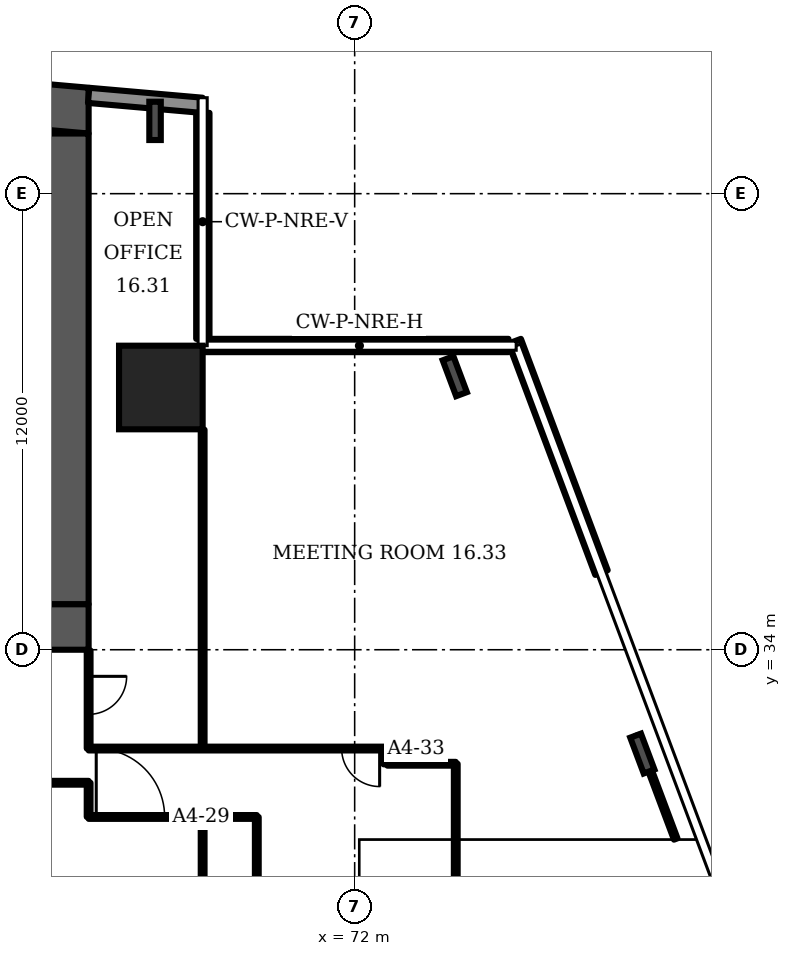
"""IFC4 building model, lengths in metres.
Left out: names, types, materials, properties, quantities, classifications, styles, units other than length and angle.
Written with IfcOpenShell. Run it as: python <this file> out.ifc"""

import sys

from ifc_helpers import new_model, si_unit, direction, frame, frame_2d, origin, origin_2d, place, context, subcontext, project, spatial, polyline, rectangle, i_section, outline, extrude, element, fill, save


model = new_model("IFC4")
c1 = context("Model", 3, precision=1e-05, world=origin(), true_north=direction((0.0, 1.0)))
c2 = subcontext(c1, "Body", "Model", "MODEL_VIEW")
j1 = project(units=[si_unit("LENGTHUNIT", "METRE"), si_unit("PLANEANGLEUNIT", "RADIAN")], contexts=[c1])
p1 = place(None, origin())
s1 = spatial("IfcSite", under=j1, at=p1, CompositionType="ELEMENT")
p2 = place(p1, origin())
s2 = spatial("IfcBuilding", under=s1, at=p2, CompositionType="ELEMENT")
p3 = place(p2, frame((0.0, 0.0, 77.5)))
s3 = spatial("IfcBuildingStorey", under=s2, at=p3, CompositionType="ELEMENT", Elevation=77.5)
p4 = place(p3, origin())
e1 = element("IfcWall", 1, at=p4, inside=s3, PredefinedType="SHEAR", context=c2, shape_type="SweptSolid", body=[
    extrude(outline(polyline([(9.0, 47.583), (37.0, 50.032), (65.0, 47.583), (65.0, 48.787), (37.0, 51.237), (9.0, 48.787), (9.0, 47.583)])), origin(), (0.0, 0.0, 1.0), 3.6),
])
p5 = place(p3, frame((9.0, 34.6, 0.0), z_axis=(0.0, 0.0, 1.0), x_axis=(1.0, 0.0, 0.0)))
e2 = element("IfcWall", 2, at=p5, inside=s3, PredefinedType="SHEAR", context=c2, shape_type="SweptSolid", body=[
    extrude(rectangle(XDim=56.0, YDim=1.2, at=frame_2d((28.0, 0.0))), origin(), (0.0, 0.0, 1.0), 3.6),
])
p6 = place(p5, frame((3.3, 0.0, 0.0)))
e3 = element("IfcOpeningElement", 3, at=p6, cuts=e2, PredefinedType="OPENING", context=c2, shape_type="SweptSolid", body=[
    extrude(rectangle(XDim=1.0, YDim=2.1, at=frame_2d((0.5, 1.05))), frame((0.0, 0.61, 0.0), z_axis=(0.0, -1.0, 0.0), x_axis=(1.0, 0.0, 0.0)), (0.0, 0.0, 1.0), 1.22),
])
p7 = place(p5, frame((7.867, 0.0, 0.0)))
e4 = element("IfcOpeningElement", 4, at=p7, cuts=e2, PredefinedType="OPENING", context=c2, shape_type="SweptSolid", body=[
    extrude(rectangle(XDim=1.1, YDim=2.1, at=frame_2d((0.55, 1.05))), frame((0.0, 0.61, 0.0), z_axis=(0.0, -1.0, 0.0), x_axis=(1.0, 0.0, 0.0)), (0.0, 0.0, 1.0), 1.22),
])
p8 = place(p5, frame((12.033, 0.0, 0.0)))
e5 = element("IfcOpeningElement", 5, at=p8, cuts=e2, PredefinedType="OPENING", context=c2, shape_type="SweptSolid", body=[
    extrude(rectangle(XDim=1.1, YDim=2.1, at=frame_2d((0.55, 1.05))), frame((0.0, 0.61, 0.0), z_axis=(0.0, -1.0, 0.0), x_axis=(1.0, 0.0, 0.0)), (0.0, 0.0, 1.0), 1.22),
])
p9 = place(p5, frame((9.8, 0.0, 0.0)))
e6 = element("IfcOpeningElement", 6, at=p9, cuts=e2, PredefinedType="OPENING", context=c2, shape_type="SweptSolid", body=[
    extrude(rectangle(XDim=1.4, YDim=2.1, at=frame_2d((0.7, 1.05))), frame((0.0, 0.61, 0.0), z_axis=(0.0, -1.0, 0.0), x_axis=(1.0, 0.0, 0.0)), (0.0, 0.0, 1.0), 1.22),
])
p10 = place(p5, frame((14.65, 0.0, 0.0)))
e7 = element("IfcOpeningElement", 7, at=p10, cuts=e2, PredefinedType="OPENING", context=c2, shape_type="SweptSolid", body=[
    extrude(rectangle(XDim=1.2, YDim=2.1, at=frame_2d((0.6, 1.05))), frame((0.0, 0.61, 0.0), z_axis=(0.0, -1.0, 0.0), x_axis=(1.0, 0.0, 0.0)), (0.0, 0.0, 1.0), 1.22),
])
p11 = place(p5, frame((21.867, 0.0, 0.0)))
e8 = element("IfcOpeningElement", 8, at=p11, cuts=e2, PredefinedType="OPENING", context=c2, shape_type="SweptSolid", body=[
    extrude(rectangle(XDim=1.1, YDim=2.1, at=frame_2d((0.55, 1.05))), frame((0.0, 0.61, 0.0), z_axis=(0.0, -1.0, 0.0), x_axis=(1.0, 0.0, 0.0)), (0.0, 0.0, 1.0), 1.22),
])
p12 = place(p5, frame((26.033, 0.0, 0.0)))
e9 = element("IfcOpeningElement", 9, at=p12, cuts=e2, PredefinedType="OPENING", context=c2, shape_type="SweptSolid", body=[
    extrude(rectangle(XDim=1.1, YDim=2.1, at=frame_2d((0.55, 1.05))), frame((0.0, 0.61, 0.0), z_axis=(0.0, -1.0, 0.0), x_axis=(1.0, 0.0, 0.0)), (0.0, 0.0, 1.0), 1.22),
])
p13 = place(p5, frame((23.8, 0.0, 0.0)))
e10 = element("IfcOpeningElement", 10, at=p13, cuts=e2, PredefinedType="OPENING", context=c2, shape_type="SweptSolid", body=[
    extrude(rectangle(XDim=1.4, YDim=2.1, at=frame_2d((0.7, 1.05))), frame((0.0, 0.61, 0.0), z_axis=(0.0, -1.0, 0.0), x_axis=(1.0, 0.0, 0.0)), (0.0, 0.0, 1.0), 1.22),
])
p14 = place(p5, frame((28.867, 0.0, 0.0)))
e11 = element("IfcOpeningElement", 11, at=p14, cuts=e2, PredefinedType="OPENING", context=c2, shape_type="SweptSolid", body=[
    extrude(rectangle(XDim=1.1, YDim=2.1, at=frame_2d((0.55, 1.05))), frame((0.0, 0.61, 0.0), z_axis=(0.0, -1.0, 0.0), x_axis=(1.0, 0.0, 0.0)), (0.0, 0.0, 1.0), 1.22),
])
p15 = place(p5, frame((33.033, 0.0, 0.0)))
e12 = element("IfcOpeningElement", 12, at=p15, cuts=e2, PredefinedType="OPENING", context=c2, shape_type="SweptSolid", body=[
    extrude(rectangle(XDim=1.1, YDim=2.1, at=frame_2d((0.55, 1.05))), frame((0.0, 0.61, 0.0), z_axis=(0.0, -1.0, 0.0), x_axis=(1.0, 0.0, 0.0)), (0.0, 0.0, 1.0), 1.22),
])
p16 = place(p5, frame((40.15, 0.0, 0.0)))
e13 = element("IfcOpeningElement", 13, at=p16, cuts=e2, PredefinedType="OPENING", context=c2, shape_type="SweptSolid", body=[
    extrude(rectangle(XDim=1.2, YDim=2.1, at=frame_2d((0.6, 1.05))), frame((0.0, 0.61, 0.0), z_axis=(0.0, -1.0, 0.0), x_axis=(1.0, 0.0, 0.0)), (0.0, 0.0, 1.0), 1.22),
])
p17 = place(p5, frame((44.8, 0.0, 0.0)))
e14 = element("IfcOpeningElement", 14, at=p17, cuts=e2, PredefinedType="OPENING", context=c2, shape_type="SweptSolid", body=[
    extrude(rectangle(XDim=1.4, YDim=2.1, at=frame_2d((0.7, 1.05))), frame((0.0, 0.61, 0.0), z_axis=(0.0, -1.0, 0.0), x_axis=(1.0, 0.0, 0.0)), (0.0, 0.0, 1.0), 1.22),
])
p18 = place(p5, frame((49.867, 0.0, 0.0)))
e15 = element("IfcOpeningElement", 15, at=p18, cuts=e2, PredefinedType="OPENING", context=c2, shape_type="SweptSolid", body=[
    extrude(rectangle(XDim=1.1, YDim=2.1, at=frame_2d((0.55, 1.05))), frame((0.0, 0.61, 0.0), z_axis=(0.0, -1.0, 0.0), x_axis=(1.0, 0.0, 0.0)), (0.0, 0.0, 1.0), 1.22),
])
p19 = place(p5, frame((53.5, 0.0, 0.0)))
e16 = element("IfcOpeningElement", 16, at=p19, cuts=e2, PredefinedType="OPENING", context=c2, shape_type="SweptSolid", body=[
    extrude(rectangle(XDim=1.1, YDim=2.1, at=frame_2d((0.55, 1.05))), frame((0.0, 0.61, 0.0), z_axis=(0.0, -1.0, 0.0), x_axis=(1.0, 0.0, 0.0)), (0.0, 0.0, 1.0), 1.22),
])
p20 = place(p5, frame((51.567, 0.0, 0.0)))
e17 = element("IfcOpeningElement", 17, at=p20, cuts=e2, PredefinedType="OPENING", context=c2, shape_type="SweptSolid", body=[
    extrude(rectangle(XDim=1.4, YDim=2.1, at=frame_2d((0.7, 1.05))), frame((0.0, 0.61, 0.0), z_axis=(0.0, -1.0, 0.0), x_axis=(1.0, 0.0, 0.0)), (0.0, 0.0, 1.0), 1.22),
])
p21 = place(p3, frame((64.4, 35.2, 0.0), z_axis=(0.0, 0.0, 1.0), x_axis=(0.0, 1.0, 0.0)))
e18 = element("IfcWall", 18, at=p21, inside=s3, PredefinedType="SHEAR", context=c2, shape_type="SweptSolid", body=[
    extrude(rectangle(XDim=12.383, YDim=1.2, at=frame_2d((6.191, 0.0))), origin(), (0.0, 0.0, 1.0), 3.6),
])
p22 = place(p3, frame((66.9, 40.9, 0.0), z_axis=(0.0, 0.0, 1.0), x_axis=(1.0, 0.0, 0.0)))
e19 = element("IfcColumn", 19, at=p22, inside=s3, PredefinedType="COLUMN", context=c2, shape_type="SweptSolid", body=[
    extrude(rectangle(XDim=2.2, YDim=2.2, at=origin_2d()), origin(), (0.0, 0.0, 1.0), 3.6),
])
for number, where, z_axis, x_axis in (
    (20, (79.57, 31.268, 0.0), (0.0, 0.0, 1.0), (0.936, 0.351, 0.0)),
    (21, (74.634, 41.196, 0.0), (0.0, 0.0, 1.0), (0.936, 0.351, 0.0)),
    (22, (66.748, 47.915, 0.0), (0.0, 0.0, 1.0), (1.0, 0.0, 0.0)),
):
    element("IfcColumn", number, at=place(p3, frame(where, z_axis=z_axis, x_axis=x_axis)), inside=s3, PredefinedType="COLUMN", context=c2, shape_type="SweptSolid", body=[
        extrude(i_section(OverallWidth=0.302, OverallDepth=1.008, WebThickness=0.021, FlangeThickness=0.04, FilletRadius=0.03, at=origin_2d()), origin(), (0.0, 0.0, 1.0), 3.6),
    ])
p23 = place(p3, frame((67.983, 48.326, 0.0), z_axis=(0.0, 0.0, 1.0), x_axis=(-0.996194, 0.087168, 0.0)))
e23 = element("IfcWall", 23, at=p23, inside=s3, PredefinedType="SOLIDWALL", context=c2, shape_type="SweptSolid", body=[
    extrude(rectangle(XDim=2.994, YDim=0.4, at=frame_2d((1.497, 0.0))), origin(), (0.0, 0.0, 1.0), 3.2),
])
p24 = place(p3, frame((78.494, 36.03, 0.0), z_axis=(0.0, 0.0, 1.0), x_axis=(-0.351108, 0.936338, 0.0)))
e24 = element("IfcWall", 24, at=p24, inside=s3, PredefinedType="SOLIDWALL", context=c2, shape_type="SweptSolid", body=[
    extrude(rectangle(XDim=6.503, YDim=0.35, at=frame_2d((3.251, 0.0))), origin(), (0.0, 0.0, 1.0), 1.0),
])
p25 = place(p3, frame((76.047, 42.005, 0.0), z_axis=(0.0, 0.0, 1.0), x_axis=(-1.0, 0.0, 0.0)))
e25 = element("IfcWall", 25, at=p25, inside=s3, PredefinedType="SOLIDWALL", context=c2, shape_type="SweptSolid", body=[
    extrude(rectangle(XDim=8.047, YDim=0.35, at=frame_2d((4.023, 0.0))), origin(), (0.0, 0.0, 1.0), 1.0),
])
p26 = place(p3, frame((68.005, 42.18, 0.0), z_axis=(0.0, 0.0, 1.0), x_axis=(0.0, 1.0, 0.0)))
e26 = element("IfcWall", 26, at=p26, inside=s3, PredefinedType="SOLIDWALL", context=c2, shape_type="SweptSolid", body=[
    extrude(rectangle(XDim=5.947, YDim=0.35, at=frame_2d((2.973, 0.0))), origin(), (0.0, 0.0, 1.0), 1.0),
])
p27 = place(p3, frame((45.3, 30.5, 0.0), z_axis=(0.0, 0.0, 1.0), x_axis=(1.0, 0.0, 0.0)))
e27 = element("IfcWall", 27, at=p27, inside=s3, PredefinedType="PARTITIONING", context=c2, shape_type="SweptSolid", body=[
    extrude(rectangle(XDim=19.7, YDim=0.1, at=frame_2d((9.85, 0.0))), origin(), (0.0, 0.0, 1.0), 3.2),
])
p28 = place(p3, frame((65.0, 29.6, 0.0), z_axis=(0.0, 0.0, 1.0), x_axis=(0.0, 1.0, 0.0)))
e28 = element("IfcWall", 28, at=p28, inside=s3, PredefinedType="PARTITIONING", context=c2, shape_type="SweptSolid", body=[
    extrude(rectangle(XDim=0.9, YDim=0.1, at=frame_2d((0.45, 0.0))), origin(), (0.0, 0.0, 1.0), 3.2),
])
p29 = place(p3, frame((65.0, 29.6, 0.0), z_axis=(0.0, 0.0, 1.0), x_axis=(1.0, 0.0, 0.0)))
e29 = element("IfcWall", 29, at=p29, inside=s3, PredefinedType="PARTITIONING", context=c2, shape_type="SweptSolid", body=[
    extrude(rectangle(XDim=4.425, YDim=0.1, at=frame_2d((2.212, 0.0))), origin(), (0.0, 0.0, 1.0), 3.2),
])
p30 = place(p29, frame((0.2, 0.0, 0.0)))
e30 = element("IfcOpeningElement", 30, at=p30, cuts=e29, PredefinedType="OPENING", context=c2, shape_type="SweptSolid", body=[
    extrude(rectangle(XDim=1.8, YDim=2.1, at=frame_2d((0.9, 1.05))), frame((0.0, 0.06, 0.0), z_axis=(0.0, -1.0, 0.0), x_axis=(1.0, 0.0, 0.0)), (0.0, 0.0, 1.0), 0.12),
])
p31 = place(p3, frame((65.0, 31.4, 0.0), z_axis=(0.0, 0.0, 1.0), x_axis=(0.0, 1.0, 0.0)))
e31 = element("IfcWall", 31, at=p31, inside=s3, PredefinedType="PARTITIONING", context=c2, shape_type="SweptSolid", body=[
    extrude(rectangle(XDim=2.58, YDim=0.1, at=frame_2d((1.29, 0.0))), origin(), (0.0, 0.0, 1.0), 3.2),
])
p32 = place(p31, frame((0.9, 0.0, 0.0)))
e32 = element("IfcOpeningElement", 32, at=p32, cuts=e31, PredefinedType="OPENING", context=c2, shape_type="SweptSolid", body=[
    extrude(rectangle(XDim=1.0, YDim=2.1, at=frame_2d((0.5, 1.05))), frame((0.0, 0.06, 0.0), z_axis=(0.0, -1.0, 0.0), x_axis=(1.0, 0.0, 0.0)), (0.0, 0.0, 1.0), 0.12),
])
p33 = place(p3, frame((65.0, 31.4, 0.0), z_axis=(0.0, 0.0, 1.0), x_axis=(1.0, 0.0, 0.0)))
e33 = element("IfcWall", 33, at=p33, inside=s3, PredefinedType="PARTITIONING", context=c2, shape_type="SweptSolid", body=[
    extrude(rectangle(XDim=7.81, YDim=0.1, at=frame_2d((3.905, 0.0))), origin(), (0.0, 0.0, 1.0), 3.2),
])
p34 = place(p33, frame((6.657, 0.0, 0.0)))
e34 = element("IfcOpeningElement", 34, at=p34, cuts=e33, PredefinedType="OPENING", context=c2, shape_type="SweptSolid", body=[
    extrude(rectangle(XDim=1.0, YDim=2.1, at=frame_2d((0.5, 1.05))), frame((0.0, 0.06, 0.0), z_axis=(0.0, -1.0, 0.0), x_axis=(1.0, 0.0, 0.0)), (0.0, 0.0, 1.0), 0.12),
])
p35 = place(p3, frame((68.0, 13.24, 0.0), z_axis=(0.0, 0.0, 1.0), x_axis=(0.0, 1.0, 0.0)))
e35 = element("IfcWall", 35, at=p35, inside=s3, PredefinedType="PARTITIONING", context=c2, shape_type="SweptSolid", body=[
    extrude(rectangle(XDim=16.36, YDim=0.1, at=frame_2d((8.18, 0.0))), origin(), (0.0, 0.0, 1.0), 3.2),
])
p36 = place(p3, frame((68.0, 31.4, 0.0), z_axis=(0.0, 0.0, 1.0), x_axis=(0.0, 1.0, 0.0)))
e36 = element("IfcWall", 36, at=p36, inside=s3, PredefinedType="PARTITIONING", context=c2, shape_type="SweptSolid", body=[
    extrude(rectangle(XDim=8.39, YDim=0.1, at=frame_2d((4.195, 0.0))), origin(), (0.0, 0.0, 1.0), 3.2),
])
p37 = place(p3, frame((69.425, 26.4, 0.0), z_axis=(0.0, 0.0, 1.0), x_axis=(0.0, 1.0, 0.0)))
e37 = element("IfcWall", 37, at=p37, inside=s3, PredefinedType="PARTITIONING", context=c2, shape_type="SweptSolid", body=[
    extrude(rectangle(XDim=3.2, YDim=0.1, at=frame_2d((1.6, 0.0))), origin(), (0.0, 0.0, 1.0), 3.2),
])
p38 = place(p3, frame((72.81, 30.985, 0.0), z_axis=(0.0, 0.0, 1.0), x_axis=(0.0, 1.0, 0.0)))
e38 = element("IfcWall", 38, at=p38, inside=s3, PredefinedType="PARTITIONING", context=c2, shape_type="SweptSolid", body=[
    extrude(rectangle(XDim=0.415, YDim=0.1, at=frame_2d((0.208, 0.0))), origin(), (0.0, 0.0, 1.0), 3.2),
])
p39 = place(p3, frame((72.86, 31.0, 0.0), z_axis=(0.0, 0.0, 1.0), x_axis=(1.0, 0.0, 0.0)))
e39 = element("IfcWall", 39, at=p39, inside=s3, PredefinedType="PARTITIONING", context=c2, shape_type="SweptSolid", body=[
    extrude(rectangle(XDim=1.8, YDim=0.1, at=frame_2d((0.9, 0.0))), origin(), (0.0, 0.0, 1.0), 3.2),
])
p40 = place(p3, frame((74.66, 27.675, 0.0), z_axis=(0.0, 0.0, 1.0), x_axis=(0.0, 1.0, 0.0)))
e40 = element("IfcWall", 40, at=p40, inside=s3, PredefinedType="PARTITIONING", context=c2, shape_type="SweptSolid", body=[
    extrude(rectangle(XDim=3.325, YDim=0.1, at=frame_2d((1.663, 0.0))), origin(), (0.0, 0.0, 1.0), 3.2),
])
p41 = place(p3, frame((80.448, 29.02, 0.0), z_axis=(0.0, 0.0, 1.0), x_axis=(-0.35129, 0.93627, 0.0)))
e41 = element("IfcWall", 41, at=p41, inside=s3, PredefinedType="PARTITIONING", context=c2, shape_type="SweptSolid", body=[
    extrude(rectangle(XDim=2.911, YDim=0.1, at=frame_2d((1.455, 0.0))), origin(), (0.0, 0.0, 1.0), 2.58),
])
p42 = place(p30, origin())
e42 = element("IfcDoor", 42, at=p42, inside=s3, OperationType="DOUBLE_DOOR_SINGLE_SWING", PredefinedType="DOOR", context=c2, shape_type="SweptSolid", body=[
    extrude(rectangle(XDim=1.8, YDim=2.1, at=frame_2d((0.9, 1.05))), frame((0.0, 0.025, 0.0), z_axis=(0.0, -1.0, 0.0), x_axis=(1.0, 0.0, 0.0)), (0.0, 0.0, 1.0), 0.05),
])
fill(e30, e42)
p43 = place(p34, origin())
e43 = element("IfcDoor", 43, at=p43, inside=s3, OperationType="SINGLE_SWING_RIGHT", PredefinedType="DOOR", context=c2, shape_type="SweptSolid", body=[
    extrude(rectangle(XDim=1.0, YDim=2.1, at=frame_2d((0.5, 1.05))), frame((0.0, 0.025, 0.0), z_axis=(0.0, -1.0, 0.0), x_axis=(1.0, 0.0, 0.0)), (0.0, 0.0, 1.0), 0.05),
])
fill(e34, e43)
p44 = place(p32, origin())
e44 = element("IfcDoor", 44, at=p44, inside=s3, OperationType="SINGLE_SWING_RIGHT", PredefinedType="DOOR", context=c2, shape_type="SweptSolid", body=[
    extrude(rectangle(XDim=1.0, YDim=2.1, at=frame_2d((0.5, 1.05))), frame((0.0, 0.025, 0.0), z_axis=(0.0, -1.0, 0.0), x_axis=(1.0, 0.0, 0.0)), (0.0, 0.0, 1.0), 0.05),
])
fill(e32, e44)
save(model, sys.argv[1])
